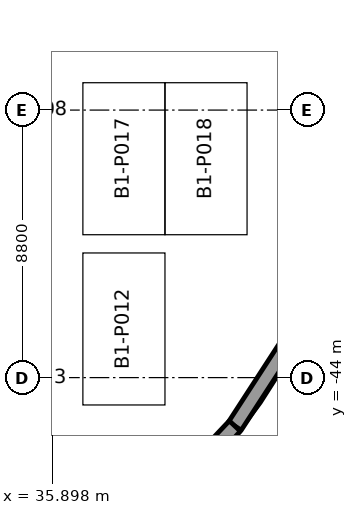
"""IFC4 building model, lengths in metres.
Left out: names, types, materials, properties, quantities, classifications, styles, units other than length and angle.
Written with IfcOpenShell. Run it as: python <this file> out.ifc"""

import sys

from ifc_helpers import new_model, si_unit, direction, frame, frame_2d, origin, place, context, subcontext, project, spatial, rectangle, extrude, element, save


model = new_model("IFC4")
c1 = context("Model", 3, precision=1e-05, world=origin(), true_north=direction((0.0, 1.0)))
c2 = subcontext(c1, "Body", "Model", "MODEL_VIEW")
j1 = project(units=[si_unit("LENGTHUNIT", "METRE"), si_unit("PLANEANGLEUNIT", "RADIAN")], contexts=[c1])
p1 = place(None, origin())
s1 = spatial("IfcSite", under=j1, at=p1, CompositionType="ELEMENT")
p2 = place(p1, origin())
s2 = spatial("IfcBuilding", under=s1, at=p2, CompositionType="ELEMENT")
p3 = place(p2, frame((0.0, 0.0, -4.5)))
s3 = spatial("IfcBuildingStorey", under=s2, at=p3, CompositionType="ELEMENT", Elevation=-4.5)
p4 = place(p3, frame((43.809, -42.65, 0.0), z_axis=(0.0, 0.0, 1.0), x_axis=(-0.544416054245, -0.838815331214, 0.0)))
e1 = element("IfcWall", 1, at=p4, inside=s3, PredefinedType="SOLIDWALL", context=c2, shape_type="SweptSolid", body=[
    extrude(rectangle(XDim=3.51, YDim=0.5, at=frame_2d((1.755, 0.0))), origin(), (0.0, 0.0, 1.0), 4.5),
])
p5 = place(p3, frame((41.898, -45.594, 0.0), z_axis=(0.0, 0.0, 1.0), x_axis=(-0.686862366834, -0.726787512982, 0.0)))
e2 = element("IfcWall", 2, at=p5, inside=s3, PredefinedType="SOLIDWALL", context=c2, shape_type="SweptSolid", body=[
    extrude(rectangle(XDim=2.281, YDim=0.5, at=frame_2d((1.14, 0.0))), origin(), (0.0, 0.0, 1.0), 4.5),
])
save(model, sys.argv[1])
